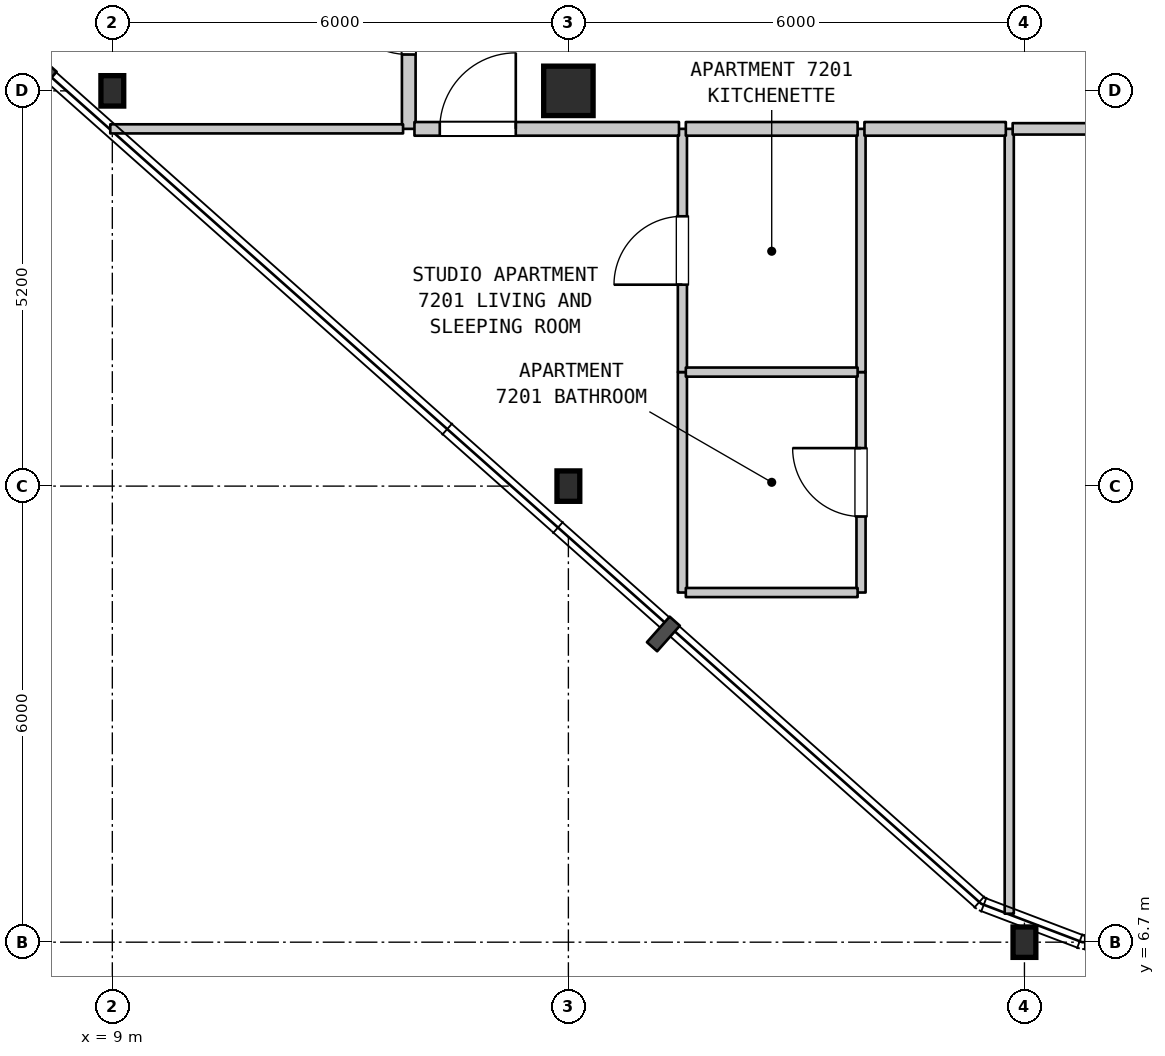
"""IFC4 building model, lengths in metres.
Left out: names, types, materials, properties, quantities, classifications, styles, units other than length and angle.
Written with IfcOpenShell. Run it as: python <this file> out.ifc"""

import sys

from ifc_helpers import new_model, si_unit, direction, frame, frame_2d, origin, origin_2d, place, context, subcontext, project, spatial, rectangle, i_section, extrude, element, fill, save


model = new_model("IFC4")
c1 = context("Model", 3, precision=1e-05, world=origin(), true_north=direction((0.0, 1.0)))
c2 = subcontext(c1, "Body", "Model", "MODEL_VIEW")
j1 = project(units=[si_unit("LENGTHUNIT", "METRE"), si_unit("PLANEANGLEUNIT", "RADIAN")], contexts=[c1])
p1 = place(None, origin())
s1 = spatial("IfcSite", under=j1, at=p1, CompositionType="ELEMENT")
p2 = place(p1, origin())
s2 = spatial("IfcBuilding", under=s1, at=p2, CompositionType="ELEMENT")
p3 = place(p2, frame((0.0, 0.0, 288.0)))
s3 = spatial("IfcBuildingStorey", under=s2, at=p3, CompositionType="ELEMENT", Elevation=288.0)
for number, where, z_axis, x_axis in (
    (1, (9.0, 17.9, 0.0), (0.0, 0.0, 1.0), (1.0, 0.0, 0.0)),
    (2, (15.0, 12.7, 0.0), (0.0, 0.0, 1.0), (1.0, 0.0, 0.0)),
):
    element("IfcColumn", number, at=place(p3, frame(where, z_axis=z_axis, x_axis=x_axis)), inside=s3, PredefinedType="COLUMN", context=c2, shape_type="SweptSolid", body=[
        extrude(i_section(OverallWidth=0.3, OverallDepth=0.4, WebThickness=0.013, FlangeThickness=0.024, FilletRadius=0.027, at=origin_2d()), origin(), (0.0, 0.0, 1.0), 3.7),
    ])
p4 = place(p3, frame((15.0, 17.9, 0.0), z_axis=(0.0, 0.0, 1.0), x_axis=(1.0, 0.0, 0.0)))
e3 = element("IfcColumn", 3, at=p4, inside=s3, PredefinedType="COLUMN", context=c2, shape_type="SweptSolid", body=[
    extrude(rectangle(XDim=0.65, YDim=0.65, at=origin_2d()), origin(), (0.0, 0.0, 1.0), 3.7),
])
p5 = place(p3, frame((21.0, 6.7, 0.0), z_axis=(0.0, 0.0, 1.0), x_axis=(1.0, 0.0, 0.0)))
e4 = element("IfcColumn", 4, at=p5, inside=s3, PredefinedType="COLUMN", context=c2, shape_type="SweptSolid", body=[
    extrude(i_section(OverallWidth=0.3, OverallDepth=0.4, WebThickness=0.013, FlangeThickness=0.024, FilletRadius=0.027, at=origin_2d()), origin(), (0.0, 0.0, 1.0), 3.7),
])
p6 = place(p3, frame((12.9, 17.4, 0.0), z_axis=(0.0, 0.0, 1.0), x_axis=(0.0, 1.0, 0.0)))
e5 = element("IfcWall", 5, at=p6, inside=s3, PredefinedType="STANDARD", context=c2, shape_type="SweptSolid", body=[
    extrude(rectangle(XDim=3.1, YDim=0.18, at=frame_2d((1.55, 0.0))), origin(), (0.0, 0.0, 1.0), 3.39),
])
p7 = place(p6, frame((0.978, 0.0, 0.0)))
e6 = element("IfcOpeningElement", 6, at=p7, cuts=e5, PredefinedType="OPENING", context=c2, shape_type="SweptSolid", body=[
    extrude(rectangle(XDim=1.0, YDim=2.15, at=frame_2d((0.5, 1.075))), frame((0.0, 0.1, 0.0), z_axis=(0.0, -1.0, 0.0), x_axis=(1.0, 0.0, 0.0)), (0.0, 0.0, 1.0), 0.2),
])
p8 = place(p3, frame((16.5, 11.3, 0.0), z_axis=(0.0, 0.0, 1.0), x_axis=(0.0, 1.0, 0.0)))
e7 = element("IfcWall", 7, at=p8, inside=s3, PredefinedType="PARTITIONING", context=c2, shape_type="SweptSolid", body=[
    extrude(rectangle(XDim=2.9, YDim=0.12, at=frame_2d((1.45, 0.0))), origin(), (0.0, 0.0, 1.0), 3.39),
])
p9 = place(p3, frame((16.5, 14.2, 0.0), z_axis=(0.0, 0.0, 1.0), x_axis=(0.0, 1.0, 0.0)))
e8 = element("IfcWall", 8, at=p9, inside=s3, PredefinedType="PARTITIONING", context=c2, shape_type="SweptSolid", body=[
    extrude(rectangle(XDim=3.2, YDim=0.12, at=frame_2d((1.6, 0.0))), origin(), (0.0, 0.0, 1.0), 3.39),
])
p10 = place(p9, frame((1.15, 0.0, 0.0)))
e9 = element("IfcOpeningElement", 9, at=p10, cuts=e8, PredefinedType="OPENING", context=c2, shape_type="SweptSolid", body=[
    extrude(rectangle(XDim=0.9, YDim=2.15, at=frame_2d((0.45, 1.075))), frame((0.0, 0.07, 0.0), z_axis=(0.0, -1.0, 0.0), x_axis=(1.0, 0.0, 0.0)), (0.0, 0.0, 1.0), 0.14),
])
p11 = place(p3, frame((18.85, 11.3, 0.0), z_axis=(0.0, 0.0, 1.0), x_axis=(0.0, 1.0, 0.0)))
e10 = element("IfcWall", 10, at=p11, inside=s3, PredefinedType="PARTITIONING", context=c2, shape_type="SweptSolid", body=[
    extrude(rectangle(XDim=2.9, YDim=0.12, at=frame_2d((1.45, 0.0))), origin(), (0.0, 0.0, 1.0), 3.39),
])
p12 = place(p11, frame((1.0, 0.0, 0.0)))
e11 = element("IfcOpeningElement", 11, at=p12, cuts=e10, PredefinedType="OPENING", context=c2, shape_type="SweptSolid", body=[
    extrude(rectangle(XDim=0.9, YDim=2.1, at=frame_2d((0.45, 1.05))), frame((0.0, 0.07, 0.0), z_axis=(0.0, -1.0, 0.0), x_axis=(1.0, 0.0, 0.0)), (0.0, 0.0, 1.0), 0.14),
])
p13 = place(p3, frame((18.85, 14.2, 0.0), z_axis=(0.0, 0.0, 1.0), x_axis=(0.0, 1.0, 0.0)))
e12 = element("IfcWall", 12, at=p13, inside=s3, PredefinedType="PARTITIONING", context=c2, shape_type="SweptSolid", body=[
    extrude(rectangle(XDim=3.2, YDim=0.12, at=frame_2d((1.6, 0.0))), origin(), (0.0, 0.0, 1.0), 3.39),
])
p14 = place(p3, frame((20.8, 7.075, 0.0), z_axis=(0.0, 0.0, 1.0), x_axis=(0.0, 1.0, 0.0)))
e13 = element("IfcWall", 13, at=p14, inside=s3, PredefinedType="PARTITIONING", context=c2, shape_type="SweptSolid", body=[
    extrude(rectangle(XDim=10.325, YDim=0.12, at=frame_2d((5.163, 0.0))), origin(), (0.0, 0.0, 1.0), 3.39),
])
for number, where, z_axis, x_axis in (
    (14, (16.545, 11.3, 0.0), (0.0, 0.0, 1.0), (1.0, 0.0, 0.0)),
    (15, (16.545, 14.2, 0.0), (0.0, 0.0, 1.0), (1.0, 0.0, 0.0)),
):
    element("IfcWall", number, at=place(p3, frame(where, z_axis=z_axis, x_axis=x_axis)), inside=s3, PredefinedType="PARTITIONING", context=c2, shape_type="SweptSolid", body=[
        extrude(rectangle(XDim=2.26, YDim=0.12, at=frame_2d((1.13, 0.0))), origin(), (0.0, 0.0, 1.0), 3.39),
    ])
p15 = place(p3, frame((8.973, 17.4, 0.0), z_axis=(0.0, 0.0, 1.0), x_axis=(1.0, 0.0, 0.0)))
e16 = element("IfcWall", 16, at=p15, inside=s3, PredefinedType="PARTITIONING", context=c2, shape_type="SweptSolid", body=[
    extrude(rectangle(XDim=3.852, YDim=0.12, at=frame_2d((1.926, 0.0))), origin(), (0.0, 0.0, 1.0), 3.39),
])
p16 = place(p3, frame((12.975, 17.4, 0.0), z_axis=(0.0, 0.0, 1.0), x_axis=(1.0, 0.0, 0.0)))
e17 = element("IfcWall", 17, at=p16, inside=s3, PredefinedType="STANDARD", context=c2, shape_type="SweptSolid", body=[
    extrude(rectangle(XDim=3.48, YDim=0.18, at=frame_2d((1.74, 0.0))), origin(), (0.0, 0.0, 1.0), 3.39),
])
p17 = place(p16, frame((0.333, 0.0, 0.0)))
e18 = element("IfcOpeningElement", 18, at=p17, cuts=e17, PredefinedType="OPENING", context=c2, shape_type="SweptSolid", body=[
    extrude(rectangle(XDim=1.0, YDim=2.15, at=frame_2d((0.5, 1.075))), frame((0.0, 0.1, 0.0), z_axis=(0.0, -1.0, 0.0), x_axis=(1.0, 0.0, 0.0)), (0.0, 0.0, 1.0), 0.2),
])
p18 = place(p3, frame((16.545, 17.4, 0.0), z_axis=(0.0, 0.0, 1.0), x_axis=(1.0, 0.0, 0.0)))
e19 = element("IfcWall", 19, at=p18, inside=s3, PredefinedType="STANDARD", context=c2, shape_type="SweptSolid", body=[
    extrude(rectangle(XDim=2.26, YDim=0.18, at=frame_2d((1.13, 0.0))), origin(), (0.0, 0.0, 1.0), 3.39),
])
p19 = place(p3, frame((18.895, 17.4, 0.0), z_axis=(0.0, 0.0, 1.0), x_axis=(1.0, 0.0, 0.0)))
e20 = element("IfcWall", 20, at=p19, inside=s3, PredefinedType="STANDARD", context=c2, shape_type="SweptSolid", body=[
    extrude(rectangle(XDim=1.86, YDim=0.18, at=frame_2d((0.93, 0.0))), origin(), (0.0, 0.0, 1.0), 3.39),
])
p20 = place(p3, frame((20.845, 17.4, 0.0), z_axis=(0.0, 0.0, 1.0), x_axis=(1.0, 0.0, 0.0)))
e21 = element("IfcWall", 21, at=p20, inside=s3, PredefinedType="STANDARD", context=c2, shape_type="SweptSolid", body=[
    extrude(rectangle(XDim=3.91, YDim=0.15, at=frame_2d((1.955, 0.0))), origin(), (0.0, 0.0, 1.0), 3.39),
])
p21 = place(p20, frame((1.455, 0.0, 0.0)))
e22 = element("IfcOpeningElement", 22, at=p21, cuts=e21, PredefinedType="OPENING", context=c2, shape_type="SweptSolid", body=[
    extrude(rectangle(XDim=1.0, YDim=2.15, at=frame_2d((0.5, 1.075))), frame((0.0, 0.085, 0.0), z_axis=(0.0, -1.0, 0.0), x_axis=(1.0, 0.0, 0.0)), (0.0, 0.0, 1.0), 0.17),
])
p22 = place(p7, origin())
e23 = element("IfcDoor", 23, at=p22, inside=s3, OperationType="SINGLE_SWING_RIGHT", PredefinedType="DOOR", context=c2, shape_type="SweptSolid", body=[
    extrude(rectangle(XDim=1.0, YDim=2.15, at=frame_2d((0.5, 1.075))), frame((0.0, 0.025, 0.0), z_axis=(0.0, -1.0, 0.0), x_axis=(1.0, 0.0, 0.0)), (0.0, 0.0, 1.0), 0.05),
])
fill(e6, e23)
p23 = place(p10, origin())
e24 = element("IfcDoor", 24, at=p23, inside=s3, OperationType="SINGLE_SWING_LEFT", PredefinedType="DOOR", context=c2, shape_type="SweptSolid", body=[
    extrude(rectangle(XDim=0.9, YDim=2.15, at=frame_2d((0.45, 1.075))), frame((0.0, 0.025, 0.0), z_axis=(0.0, -1.0, 0.0), x_axis=(1.0, 0.0, 0.0)), (0.0, 0.0, 1.0), 0.05),
])
fill(e9, e24)
p24 = place(p12, origin())
e25 = element("IfcDoor", 25, at=p24, inside=s3, OperationType="SINGLE_SWING_RIGHT", PredefinedType="DOOR", context=c2, shape_type="SweptSolid", body=[
    extrude(rectangle(XDim=0.9, YDim=2.1, at=frame_2d((0.45, 1.05))), frame((0.0, 0.025, 0.0), z_axis=(0.0, -1.0, 0.0), x_axis=(1.0, 0.0, 0.0)), (0.0, 0.0, 1.0), 0.05),
])
fill(e11, e25)
p25 = place(p17, origin())
e26 = element("IfcDoor", 26, at=p25, inside=s3, OperationType="SINGLE_SWING_RIGHT", PredefinedType="DOOR", context=c2, shape_type="SweptSolid", body=[
    extrude(rectangle(XDim=1.0, YDim=2.15, at=frame_2d((0.5, 1.075))), frame((0.0, 0.025, 0.0), z_axis=(0.0, -1.0, 0.0), x_axis=(1.0, 0.0, 0.0)), (0.0, 0.0, 1.0), 0.05),
])
fill(e18, e26)
save(model, sys.argv[1])
